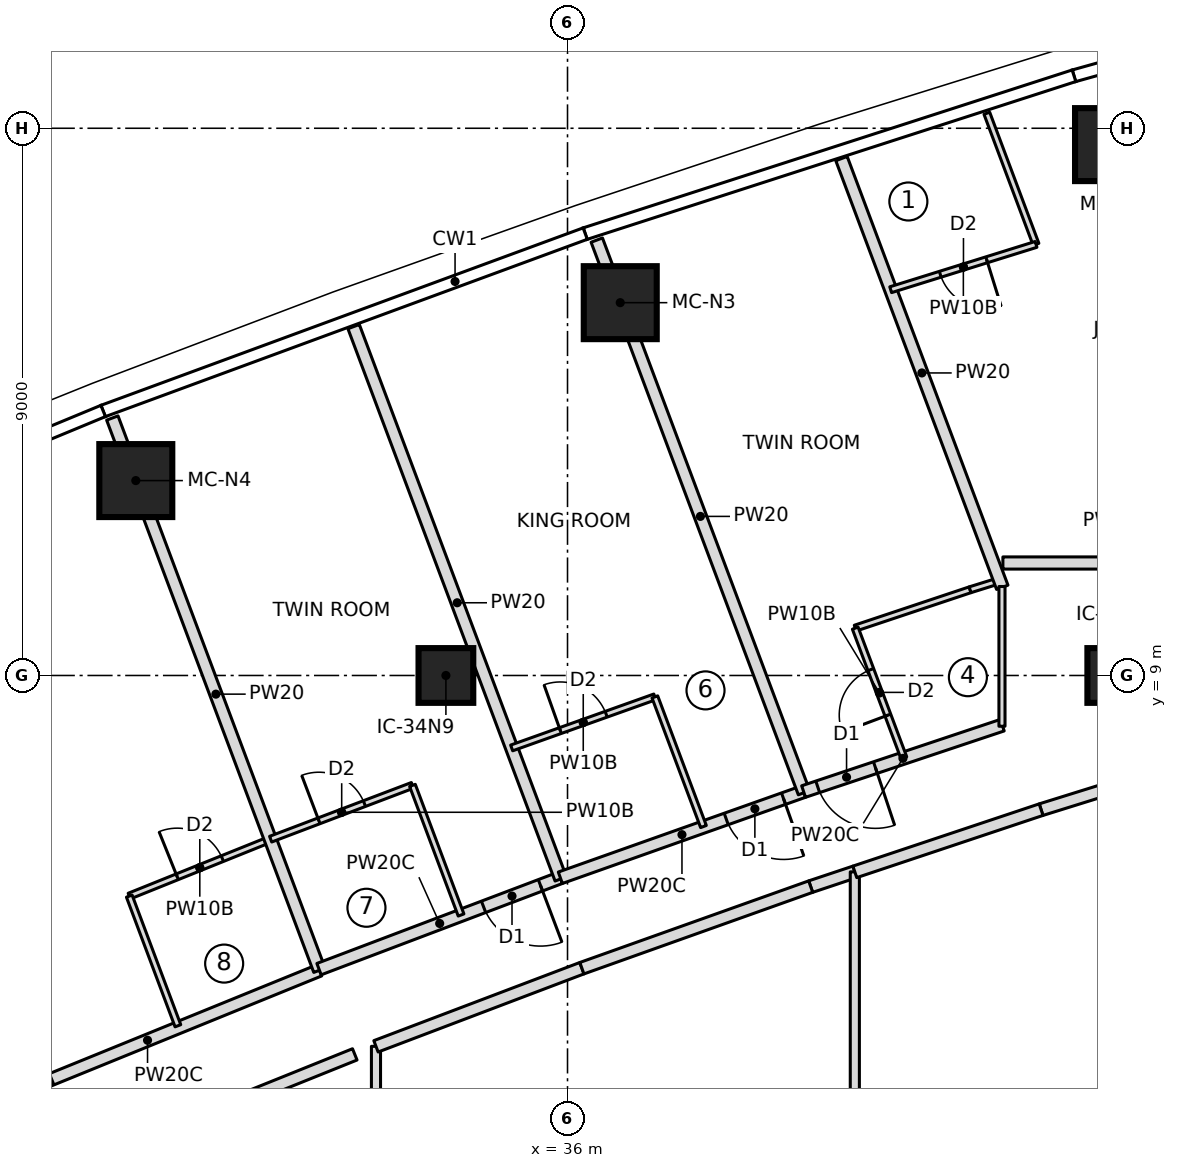
"""IFC4 building model, lengths in metres.
Left out: names, types, materials, properties, quantities, classifications, styles, units other than length and angle.
Written with IfcOpenShell. Run it as: python <this file> out.ifc"""

import sys

from ifc_helpers import new_model, si_unit, direction, frame, frame_2d, origin, origin_2d, place, context, subcontext, project, spatial, rectangle, extrude, element, fill, save


model = new_model("IFC4")
c1 = context("Model", 3, precision=1e-05, world=origin(), true_north=direction((0.0, 1.0)))
c2 = subcontext(c1, "Body", "Model", "MODEL_VIEW")
j1 = project(units=[si_unit("LENGTHUNIT", "METRE"), si_unit("PLANEANGLEUNIT", "RADIAN")], contexts=[c1])
p1 = place(None, origin())
s1 = spatial("IfcSite", under=j1, at=p1, CompositionType="ELEMENT")
p2 = place(p1, origin())
s2 = spatial("IfcBuilding", under=s1, at=p2, CompositionType="ELEMENT")
p3 = place(p2, frame((0.0, 0.0, 249.2)))
s3 = spatial("IfcBuildingStorey", under=s2, at=p3, CompositionType="ELEMENT", Elevation=249.2)
for number, where, z_axis, x_axis in (
    (1, (44.947, 17.731, 0.0), (0.0, 0.0, 1.0), (1.0, 0.0, 0.0)),
    (2, (36.867, 15.132, 0.0), (0.0, 0.0, 1.0), (1.0, 0.0, 0.0)),
    (3, (28.9, 12.205, 0.0), (0.0, 0.0, 1.0), (1.0, 0.0, 0.0)),
):
    element("IfcColumn", number, at=place(p3, frame(where, z_axis=z_axis, x_axis=x_axis)), inside=s3, PredefinedType="COLUMN", context=c2, shape_type="SweptSolid", body=[
        extrude(rectangle(XDim=1.2, YDim=1.2, at=origin_2d()), origin(), (0.0, 0.0, 1.0), 3.55),
    ])
for number, where, z_axis, x_axis in (
    (4, (34.0, 9.0, 0.0), (0.0, 0.0, 1.0), (1.0, 0.0, 0.0)),
    (5, (45.0, 9.0, 0.0), (0.0, 0.0, 1.0), (1.0, 0.0, 0.0)),
):
    element("IfcColumn", number, at=place(p3, frame(where, z_axis=z_axis, x_axis=x_axis)), inside=s3, PredefinedType="COLUMN", context=c2, shape_type="SweptSolid", body=[
        extrude(rectangle(XDim=0.9, YDim=0.9, at=origin_2d()), origin(), (0.0, 0.0, 1.0), 3.55),
    ])
p4 = place(p3, frame((26.266, 1.85, 0.0), z_axis=(0.0, 0.0, 1.0), x_axis=(0.926231512449, 0.376955150311, 0.0)))
e6 = element("IfcWall", 6, at=p4, inside=s3, PredefinedType="PARTITIONING", context=c2, shape_type="SweptSolid", body=[
    extrude(rectangle(XDim=6.105, YDim=0.2, at=frame_2d((3.052, 0.0))), origin(), (0.0, 0.0, 1.0), 3.25),
])
p5 = place(p4, frame((0.35, 0.0, 0.0)))
e7 = element("IfcOpeningElement", 7, at=p5, cuts=e6, PredefinedType="OPENING", context=c2, shape_type="SweptSolid", body=[
    extrude(rectangle(XDim=1.0, YDim=2.1, at=frame_2d((0.5, 1.05))), frame((0.0, 0.11, 0.0), z_axis=(0.0, -1.0, 0.0), x_axis=(1.0, 0.0, 0.0)), (0.0, 0.0, 1.0), 0.22),
])
p6 = place(p3, frame((28.793, 5.372, 0.0), z_axis=(0.0, 0.0, 1.0), x_axis=(0.92761232595, 0.373544338394, 0.0)))
e8 = element("IfcWall", 8, at=p6, inside=s3, PredefinedType="PARTITIONING", context=c2, shape_type="SweptSolid", body=[
    extrude(rectangle(XDim=2.5, YDim=0.1, at=frame_2d((1.25, 0.0))), origin(), (0.0, 0.0, 1.0), 3.25),
])
p7 = place(p6, frame((0.85, 0.0, 0.0)))
e9 = element("IfcOpeningElement", 9, at=p7, cuts=e8, PredefinedType="OPENING", context=c2, shape_type="SweptSolid", body=[
    extrude(rectangle(XDim=0.8, YDim=2.1, at=frame_2d((0.4, 1.05))), frame((0.0, 0.06, 0.0), z_axis=(0.0, -1.0, 0.0), x_axis=(1.0, 0.0, 0.0)), (0.0, 0.0, 1.0), 0.12),
])
p8 = place(p3, frame((29.593, 3.239, 0.0), z_axis=(0.0, 0.0, 1.0), x_axis=(-0.351158682313, 0.936315961541, 0.0)))
e10 = element("IfcWall", 10, at=p8, inside=s3, PredefinedType="PARTITIONING", context=c2, shape_type="SweptSolid", body=[
    extrude(rectangle(XDim=2.278, YDim=0.1, at=frame_2d((1.139, 0.0))), origin(), (0.0, 0.0, 1.0), 3.25),
])
p9 = place(p3, frame((31.92, 4.151, 0.0), z_axis=(0.0, 0.0, 1.0), x_axis=(-0.351126199585, 0.936328143316, 0.0)))
e11 = element("IfcWall", 11, at=p9, inside=s3, PredefinedType="PARTITIONING", context=c2, shape_type="SweptSolid", body=[
    extrude(rectangle(XDim=9.701, YDim=0.2, at=frame_2d((4.851, 0.0))), origin(), (0.0, 0.0, 1.0), 3.25),
])
p10 = place(p3, frame((35.882, 5.673, 0.0), z_axis=(0.0, 0.0, 1.0), x_axis=(-0.935189471058, -0.354147784438, 0.0)))
e12 = element("IfcWall", 12, at=p10, inside=s3, PredefinedType="PARTITIONING", context=c2, shape_type="SweptSolid", body=[
    extrude(rectangle(XDim=4.244, YDim=0.2, at=frame_2d((2.122, 0.0))), origin(), (0.0, 0.0, 1.0), 3.25),
])
p11 = place(p10, frame((0.35, 0.0, 0.0)))
e13 = element("IfcOpeningElement", 13, at=p11, cuts=e12, PredefinedType="OPENING", context=c2, shape_type="SweptSolid", body=[
    extrude(rectangle(XDim=1.0, YDim=2.1, at=frame_2d((0.5, 1.05))), frame((0.0, 0.11, 0.0), z_axis=(0.0, -1.0, 0.0), x_axis=(1.0, 0.0, 0.0)), (0.0, 0.0, 1.0), 0.22),
])
p12 = place(p3, frame((31.117, 6.308, 0.0), z_axis=(0.0, 0.0, 1.0), x_axis=(0.93495051617, 0.354778145202, 0.0)))
e14 = element("IfcWall", 14, at=p12, inside=s3, PredefinedType="PARTITIONING", context=c2, shape_type="SweptSolid", body=[
    extrude(rectangle(XDim=2.495, YDim=0.1, at=frame_2d((1.247, 0.0))), origin(), (0.0, 0.0, 1.0), 3.25),
])
p13 = place(p12, frame((0.85, 0.0, 0.0)))
e15 = element("IfcOpeningElement", 15, at=p13, cuts=e14, PredefinedType="OPENING", context=c2, shape_type="SweptSolid", body=[
    extrude(rectangle(XDim=0.8, YDim=2.1, at=frame_2d((0.4, 1.05))), frame((0.0, 0.06, 0.0), z_axis=(0.0, -1.0, 0.0), x_axis=(1.0, 0.0, 0.0)), (0.0, 0.0, 1.0), 0.12),
])
p14 = place(p3, frame((33.45, 7.193, 0.0), z_axis=(0.0, 0.0, 1.0), x_axis=(0.351135191353, -0.936324771323, 0.0)))
e16 = element("IfcWall", 16, at=p14, inside=s3, PredefinedType="PARTITIONING", context=c2, shape_type="SweptSolid", body=[
    extrude(rectangle(XDim=2.277, YDim=0.1, at=frame_2d((1.139, 0.0))), origin(), (0.0, 0.0, 1.0), 3.25),
])
p15 = place(p3, frame((35.889, 5.654, 0.0), z_axis=(0.0, 0.0, 1.0), x_axis=(-0.351117925717, 0.936331246002, 0.0)))
e17 = element("IfcWall", 17, at=p15, inside=s3, PredefinedType="PARTITIONING", context=c2, shape_type="SweptSolid", body=[
    extrude(rectangle(XDim=9.701, YDim=0.2, at=frame_2d((4.851, 0.0))), origin(), (0.0, 0.0, 1.0), 3.25),
])
p16 = place(p3, frame((39.882, 7.091, 0.0), z_axis=(0.0, 0.0, 1.0), x_axis=(-0.942537055217, -0.334101630559, 0.0)))
e18 = element("IfcWall", 18, at=p16, inside=s3, PredefinedType="PARTITIONING", context=c2, shape_type="SweptSolid", body=[
    extrude(rectangle(XDim=4.244, YDim=0.2, at=frame_2d((2.122, 0.0))), origin(), (0.0, 0.0, 1.0), 3.25),
])
p17 = place(p16, frame((0.35, 0.0, 0.0)))
e19 = element("IfcOpeningElement", 19, at=p17, cuts=e18, PredefinedType="OPENING", context=c2, shape_type="SweptSolid", body=[
    extrude(rectangle(XDim=1.0, YDim=2.1, at=frame_2d((0.5, 1.05))), frame((0.0, 0.11, 0.0), z_axis=(0.0, -1.0, 0.0), x_axis=(1.0, 0.0, 0.0)), (0.0, 0.0, 1.0), 0.22),
])
p18 = place(p3, frame((35.081, 7.808, 0.0), z_axis=(0.0, 0.0, 1.0), x_axis=(0.941896455552, 0.335903359641, 0.0)))
e20 = element("IfcWall", 20, at=p18, inside=s3, PredefinedType="PARTITIONING", context=c2, shape_type="SweptSolid", body=[
    extrude(rectangle(XDim=2.5, YDim=0.1, at=frame_2d((1.25, 0.0))), origin(), (0.0, 0.0, 1.0), 3.25),
])
p19 = place(p18, frame((0.85, 0.0, 0.0)))
e21 = element("IfcOpeningElement", 21, at=p19, cuts=e20, PredefinedType="OPENING", context=c2, shape_type="SweptSolid", body=[
    extrude(rectangle(XDim=0.8, YDim=2.1, at=frame_2d((0.4, 1.05))), frame((0.0, 0.06, 0.0), z_axis=(0.0, -1.0, 0.0), x_axis=(1.0, 0.0, 0.0)), (0.0, 0.0, 1.0), 0.12),
])
p20 = place(p3, frame((37.436, 8.648, 0.0), z_axis=(0.0, 0.0, 1.0), x_axis=(0.351229183496, -0.936289517543, 0.0)))
e22 = element("IfcWall", 22, at=p20, inside=s3, PredefinedType="PARTITIONING", context=c2, shape_type="SweptSolid", body=[
    extrude(rectangle(XDim=2.277, YDim=0.1, at=frame_2d((1.139, 0.0))), origin(), (0.0, 0.0, 1.0), 3.25),
])
p21 = place(p3, frame((39.889, 7.072, 0.0), z_axis=(0.0, 0.0, 1.0), x_axis=(-0.35112895446, 0.936327110224, 0.0)))
e23 = element("IfcWall", 23, at=p21, inside=s3, PredefinedType="PARTITIONING", context=c2, shape_type="SweptSolid", body=[
    extrude(rectangle(XDim=9.706, YDim=0.2, at=frame_2d((4.853, 0.0))), origin(), (0.0, 0.0, 1.0), 3.25),
])
p22 = place(p3, frame((43.15, 8.183, 0.0), z_axis=(0.0, 0.0, 1.0), x_axis=(-0.948477584784, -0.316844238013, 0.0)))
e24 = element("IfcWall", 24, at=p22, inside=s3, PredefinedType="PARTITIONING", context=c2, shape_type="SweptSolid", body=[
    extrude(rectangle(XDim=3.445, YDim=0.2, at=frame_2d((1.723, 0.0))), origin(), (0.0, 0.0, 1.0), 3.25),
])
p23 = place(p22, frame((2.2, 0.0, 0.0)))
e25 = element("IfcOpeningElement", 25, at=p23, cuts=e24, PredefinedType="OPENING", context=c2, shape_type="SweptSolid", body=[
    extrude(rectangle(XDim=1.0, YDim=2.1, at=frame_2d((0.5, 1.05))), frame((0.0, 0.11, 0.0), z_axis=(0.0, -1.0, 0.0), x_axis=(1.0, 0.0, 0.0)), (0.0, 0.0, 1.0), 0.22),
])
p24 = place(p3, frame((40.732, 9.779, 0.0), z_axis=(0.0, 0.0, 1.0), x_axis=(0.948499248693, 0.316779379426, 0.0)))
e26 = element("IfcWall", 26, at=p24, inside=s3, PredefinedType="PARTITIONING", context=c2, shape_type="SweptSolid", body=[
    extrude(rectangle(XDim=1.991, YDim=0.1, at=frame_2d((0.996, 0.0))), origin(), (0.0, 0.0, 1.0), 3.25),
])
p25 = place(p3, frame((42.621, 10.409, 0.0), z_axis=(0.0, 0.0, 1.0), x_axis=(0.954624465478, 0.297812239356, 0.0)))
e27 = element("IfcWall", 27, at=p25, inside=s3, PredefinedType="PARTITIONING", context=c2, shape_type="SweptSolid", body=[
    extrude(rectangle(XDim=0.511, YDim=0.1, at=frame_2d((0.255, 0.0))), origin(), (0.0, 0.0, 1.0), 3.25),
])
p26 = place(p3, frame((41.532, 7.645, 0.0), z_axis=(0.0, 0.0, 1.0), x_axis=(-0.351146927505, 0.936320370014, 0.0)))
e28 = element("IfcWall", 28, at=p26, inside=s3, PredefinedType="PARTITIONING", context=c2, shape_type="SweptSolid", body=[
    extrude(rectangle(XDim=2.278, YDim=0.1, at=frame_2d((1.139, 0.0))), origin(), (0.0, 0.0, 1.0), 3.25),
])
p27 = place(p26, frame((0.75, 0.0, 0.0)))
e29 = element("IfcOpeningElement", 29, at=p27, cuts=e28, PredefinedType="OPENING", context=c2, shape_type="SweptSolid", body=[
    extrude(rectangle(XDim=0.8, YDim=2.1, at=frame_2d((0.4, 1.05))), frame((0.0, 0.06, 0.0), z_axis=(0.0, -1.0, 0.0), x_axis=(1.0, 0.0, 0.0)), (0.0, 0.0, 1.0), 0.12),
])
p28 = place(p3, frame((43.15, 10.45, 0.0), z_axis=(0.0, 0.0, 1.0), x_axis=(-0.351119888923, 0.936330509811, 0.0)))
e30 = element("IfcWall", 30, at=p28, inside=s3, PredefinedType="PARTITIONING", context=c2, shape_type="SweptSolid", body=[
    extrude(rectangle(XDim=7.531, YDim=0.2, at=frame_2d((3.766, 0.0))), origin(), (0.0, 0.0, 1.0), 3.25),
])
p29 = place(p3, frame((42.896, 18.247, 0.0), z_axis=(0.0, 0.0, 1.0), x_axis=(0.351111827312, -0.936333532841, 0.0)))
e31 = element("IfcWall", 31, at=p29, inside=s3, PredefinedType="PARTITIONING", context=c2, shape_type="SweptSolid", body=[
    extrude(rectangle(XDim=2.304, YDim=0.1, at=frame_2d((1.152, 0.0))), origin(), (0.0, 0.0, 1.0), 3.25),
])
p30 = place(p3, frame((43.705, 16.09, 0.0), z_axis=(0.0, 0.0, 1.0), x_axis=(-0.954665433195, -0.297680887299, 0.0)))
e32 = element("IfcWall", 32, at=p30, inside=s3, PredefinedType="PARTITIONING", context=c2, shape_type="SweptSolid", body=[
    extrude(rectangle(XDim=2.504, YDim=0.1, at=frame_2d((1.252, 0.0))), origin(), (0.0, 0.0, 1.0), 3.25),
])
p31 = place(p30, frame((0.85, 0.0, 0.0)))
e33 = element("IfcOpeningElement", 33, at=p31, cuts=e32, PredefinedType="OPENING", context=c2, shape_type="SweptSolid", body=[
    extrude(rectangle(XDim=0.8, YDim=2.1, at=frame_2d((0.4, 1.05))), frame((0.0, 0.06, 0.0), z_axis=(0.0, -1.0, 0.0), x_axis=(1.0, 0.0, 0.0)), (0.0, 0.0, 1.0), 0.12),
])
p32 = place(p3, frame((29.85, 1.701, 0.0), z_axis=(0.0, 0.0, 1.0), x_axis=(0.927620073141, 0.373525099433, 0.0)))
e34 = element("IfcWall", 34, at=p32, inside=s3, PredefinedType="PARTITIONING", context=c2, shape_type="SweptSolid", body=[
    extrude(rectangle(XDim=2.858, YDim=0.2, at=frame_2d((1.429, 0.0))), origin(), (0.0, 0.0, 1.0), 3.25),
])
p33 = place(p3, frame((32.85, -2.901, 0.0), z_axis=(0.0, 0.0, 1.0), x_axis=(0.0, 1.0, 0.0)))
e35 = element("IfcWall", 35, at=p33, inside=s3, PredefinedType="PARTITIONING", context=c2, shape_type="SweptSolid", body=[
    extrude(rectangle(XDim=5.801, YDim=0.15, at=frame_2d((2.901, 0.0))), origin(), (0.0, 0.0, 1.0), 3.25),
])
p34 = place(p3, frame((39.999, 5.527, 0.0), z_axis=(0.0, 0.0, 1.0), x_axis=(0.948395804395, 0.317088943683, 0.0)))
e36 = element("IfcWall", 36, at=p34, inside=s3, PredefinedType="PARTITIONING", context=c2, shape_type="SweptSolid", body=[
    extrude(rectangle(XDim=0.765, YDim=0.2, at=frame_2d((0.383, 0.0))), origin(), (0.0, 0.0, 1.0), 3.25),
])
p35 = place(p3, frame((32.85, 2.901, 0.0), z_axis=(0.0, 0.0, 1.0), x_axis=(0.934953584606, 0.354770058816, 0.0)))
e37 = element("IfcWall", 37, at=p35, inside=s3, PredefinedType="PARTITIONING", context=c2, shape_type="SweptSolid", body=[
    extrude(rectangle(XDim=3.622, YDim=0.2, at=frame_2d((1.811, 0.0))), origin(), (0.0, 0.0, 1.0), 3.25),
])
p36 = place(p3, frame((36.236, 4.186, 0.0), z_axis=(0.0, 0.0, 1.0), x_axis=(0.941909090846, 0.335867927288, 0.0)))
e38 = element("IfcWall", 38, at=p36, inside=s3, PredefinedType="PARTITIONING", context=c2, shape_type="SweptSolid", body=[
    extrude(rectangle(XDim=3.995, YDim=0.2, at=frame_2d((1.998, 0.0))), origin(), (0.0, 0.0, 1.0), 3.25),
])
p37 = place(p3, frame((40.725, -5.77, 0.0), z_axis=(0.0, 0.0, 1.0), x_axis=(0.0, 1.0, 0.0)))
e39 = element("IfcWall", 39, at=p37, inside=s3, PredefinedType="PARTITIONING", context=c2, shape_type="SweptSolid", body=[
    extrude(rectangle(XDim=11.54, YDim=0.15, at=frame_2d((5.77, 0.0))), origin(), (0.0, 0.0, 1.0), 3.25),
])
p38 = place(p3, frame((43.788, 6.793, 0.0), z_axis=(0.0, 0.0, 1.0), x_axis=(0.954693570678, 0.29759063511, 0.0)))
e40 = element("IfcWall", 40, at=p38, inside=s3, PredefinedType="PARTITIONING", context=c2, shape_type="SweptSolid", body=[
    extrude(rectangle(XDim=1.198, YDim=0.2, at=frame_2d((0.599, 0.0))), origin(), (0.0, 0.0, 1.0), 3.25),
])
p39 = place(p3, frame((40.725, 5.77, 0.0), z_axis=(0.0, 0.0, 1.0), x_axis=(0.948486568618, 0.316817343515, 0.0)))
e41 = element("IfcWall", 41, at=p39, inside=s3, PredefinedType="PARTITIONING", context=c2, shape_type="SweptSolid", body=[
    extrude(rectangle(XDim=3.229, YDim=0.2, at=frame_2d((1.615, 0.0))), origin(), (0.0, 0.0, 1.0), 3.25),
])
p40 = place(p3, frame((43.145, 10.463, 0.0), z_axis=(0.0, 0.0, 1.0), x_axis=(0.0, -1.0, 0.0)))
e42 = element("IfcWall", 42, at=p40, inside=s3, PredefinedType="PARTITIONING", context=c2, shape_type="SweptSolid", body=[
    extrude(rectangle(XDim=2.298, YDim=0.1, at=frame_2d((1.149, 0.0))), origin(), (0.0, 0.0, 1.0), 3.25),
])
p41 = place(p3, frame((43.16, 10.85, 0.0), z_axis=(0.0, 0.0, 1.0), x_axis=(1.0, 0.0, 0.0)))
e43 = element("IfcWall", 43, at=p41, inside=s3, PredefinedType="PARTITIONING", context=c2, shape_type="SweptSolid", body=[
    extrude(rectangle(XDim=3.54, YDim=0.2, at=frame_2d((1.77, 0.0))), origin(), (0.0, 0.0, 1.0), 3.25),
])
p42 = place(p7, origin())
e44 = element("IfcDoor", 44, at=p42, inside=s3, OperationType="SINGLE_SWING_LEFT", PredefinedType="DOOR", context=c2, shape_type="SweptSolid", body=[
    extrude(rectangle(XDim=0.8, YDim=2.1, at=frame_2d((0.4, 1.05))), frame((0.0, 0.025, 0.0), z_axis=(0.0, -1.0, 0.0), x_axis=(1.0, 0.0, 0.0)), (0.0, 0.0, 1.0), 0.05),
])
fill(e9, e44)
p43 = place(p5, origin())
e45 = element("IfcDoor", 45, at=p43, inside=s3, OperationType="SINGLE_SWING_LEFT", PredefinedType="DOOR", context=c2, shape_type="SweptSolid", body=[
    extrude(rectangle(XDim=1.0, YDim=2.1, at=frame_2d((0.5, 1.05))), frame((0.0, 0.025, 0.0), z_axis=(0.0, -1.0, 0.0), x_axis=(1.0, 0.0, 0.0)), (0.0, 0.0, 1.0), 0.05),
])
fill(e7, e45)
p44 = place(p13, origin())
e46 = element("IfcDoor", 46, at=p44, inside=s3, OperationType="SINGLE_SWING_LEFT", PredefinedType="DOOR", context=c2, shape_type="SweptSolid", body=[
    extrude(rectangle(XDim=0.8, YDim=2.1, at=frame_2d((0.4, 1.05))), frame((0.0, 0.025, 0.0), z_axis=(0.0, -1.0, 0.0), x_axis=(1.0, 0.0, 0.0)), (0.0, 0.0, 1.0), 0.05),
])
fill(e15, e46)
p45 = place(p11, origin())
e47 = element("IfcDoor", 47, at=p45, inside=s3, OperationType="SINGLE_SWING_LEFT", PredefinedType="DOOR", context=c2, shape_type="SweptSolid", body=[
    extrude(rectangle(XDim=1.0, YDim=2.1, at=frame_2d((0.5, 1.05))), frame((0.0, 0.025, 0.0), z_axis=(0.0, -1.0, 0.0), x_axis=(1.0, 0.0, 0.0)), (0.0, 0.0, 1.0), 0.05),
])
fill(e13, e47)
p46 = place(p19, origin())
e48 = element("IfcDoor", 48, at=p46, inside=s3, OperationType="SINGLE_SWING_LEFT", PredefinedType="DOOR", context=c2, shape_type="SweptSolid", body=[
    extrude(rectangle(XDim=0.8, YDim=2.1, at=frame_2d((0.4, 1.05))), frame((0.0, 0.025, 0.0), z_axis=(0.0, -1.0, 0.0), x_axis=(1.0, 0.0, 0.0)), (0.0, 0.0, 1.0), 0.05),
])
fill(e21, e48)
p47 = place(p17, origin())
e49 = element("IfcDoor", 49, at=p47, inside=s3, OperationType="SINGLE_SWING_LEFT", PredefinedType="DOOR", context=c2, shape_type="SweptSolid", body=[
    extrude(rectangle(XDim=1.0, YDim=2.1, at=frame_2d((0.5, 1.05))), frame((0.0, 0.025, 0.0), z_axis=(0.0, -1.0, 0.0), x_axis=(1.0, 0.0, 0.0)), (0.0, 0.0, 1.0), 0.05),
])
fill(e19, e49)
p48 = place(p27, origin())
e50 = element("IfcDoor", 50, at=p48, inside=s3, OperationType="SINGLE_SWING_LEFT", PredefinedType="DOOR", context=c2, shape_type="SweptSolid", body=[
    extrude(rectangle(XDim=0.8, YDim=2.1, at=frame_2d((0.4, 1.05))), frame((0.0, 0.025, 0.0), z_axis=(0.0, -1.0, 0.0), x_axis=(1.0, 0.0, 0.0)), (0.0, 0.0, 1.0), 0.05),
])
fill(e29, e50)
p49 = place(p23, origin())
e51 = element("IfcDoor", 51, at=p49, inside=s3, OperationType="SINGLE_SWING_LEFT", PredefinedType="DOOR", context=c2, shape_type="SweptSolid", body=[
    extrude(rectangle(XDim=1.0, YDim=2.1, at=frame_2d((0.5, 1.05))), frame((0.0, 0.025, 0.0), z_axis=(0.0, -1.0, 0.0), x_axis=(1.0, 0.0, 0.0)), (0.0, 0.0, 1.0), 0.05),
])
fill(e25, e51)
p50 = place(p31, origin())
e52 = element("IfcDoor", 52, at=p50, inside=s3, OperationType="SINGLE_SWING_LEFT", PredefinedType="DOOR", context=c2, shape_type="SweptSolid", body=[
    extrude(rectangle(XDim=0.8, YDim=2.1, at=frame_2d((0.4, 1.05))), frame((0.0, 0.025, 0.0), z_axis=(0.0, -1.0, 0.0), x_axis=(1.0, 0.0, 0.0)), (0.0, 0.0, 1.0), 0.05),
])
fill(e33, e52)
save(model, sys.argv[1])
